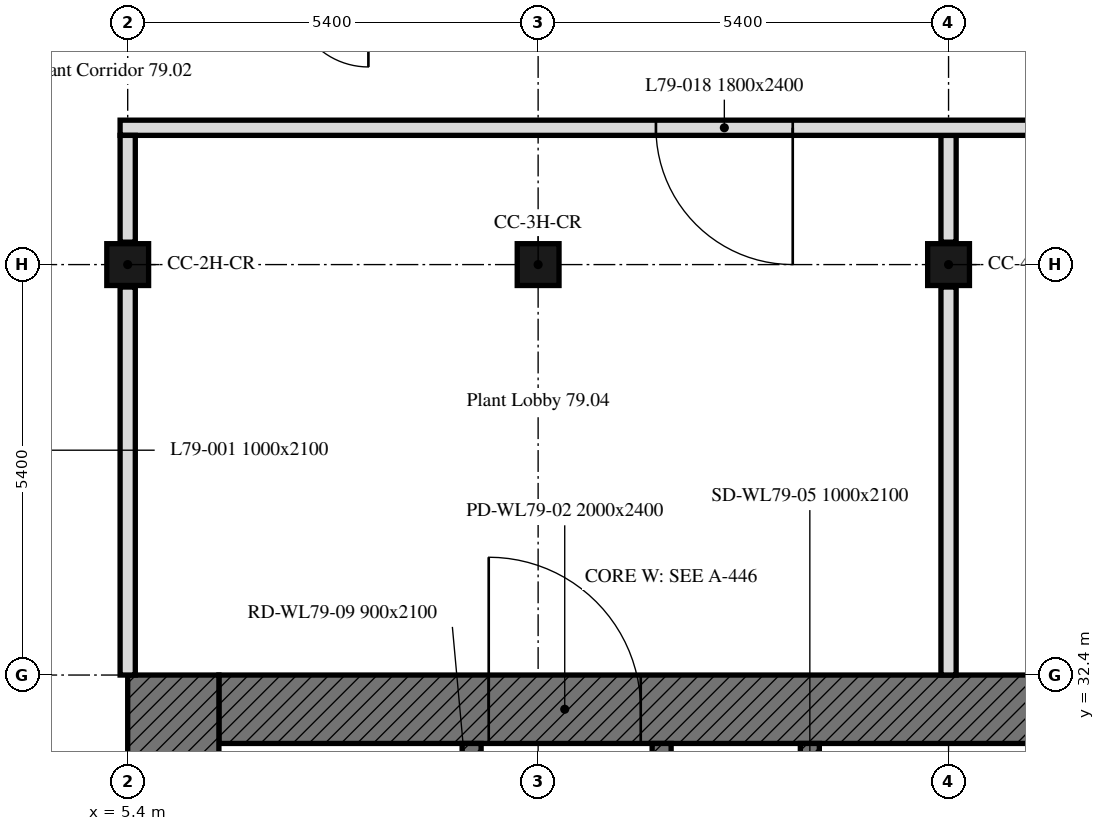
"""IFC4 building model, lengths in metres.
Left out: names, types, materials, properties, quantities, classifications, styles, units other than length and angle.
Written with IfcOpenShell. Run it as: python <this file> out.ifc"""

import sys

from ifc_helpers import new_model, si_unit, direction, frame, frame_2d, origin, origin_2d, place, context, subcontext, project, spatial, rectangle, extrude, element, fill, save


model = new_model("IFC4")
c1 = context("Model", 3, precision=1e-05, world=origin(), true_north=direction((0.0, 1.0)))
c2 = subcontext(c1, "Body", "Model", "MODEL_VIEW")
j1 = project(units=[si_unit("LENGTHUNIT", "METRE"), si_unit("PLANEANGLEUNIT", "RADIAN")], contexts=[c1])
p1 = place(None, origin())
s1 = spatial("IfcSite", under=j1, at=p1, CompositionType="ELEMENT")
p2 = place(p1, origin())
s2 = spatial("IfcBuilding", under=s1, at=p2, CompositionType="ELEMENT")
p3 = place(p2, frame((0.0, 0.0, 317.2)))
s3 = spatial("IfcBuildingStorey", under=s2, at=p3, CompositionType="ELEMENT", Elevation=317.2)
for number, where, z_axis, x_axis in (
    (1, (5.4, 37.8, 0.0), (0.0, 0.0, 1.0), (1.0, 0.0, 0.0)),
    (2, (10.8, 37.8, 0.0), (0.0, 0.0, 1.0), (1.0, 0.0, 0.0)),
    (3, (16.2, 37.8, 0.0), (0.0, 0.0, 1.0), (1.0, 0.0, 0.0)),
):
    element("IfcColumn", number, at=place(p3, frame(where, z_axis=z_axis, x_axis=x_axis)), inside=s3, PredefinedType="COLUMN", context=c2, shape_type="SweptSolid", body=[
        extrude(rectangle(XDim=0.55, YDim=0.55, at=origin_2d()), origin(), (0.0, 0.0, 1.0), 4.2),
    ])
p4 = place(p3, frame((6.6, 31.95, 0.0), z_axis=(0.0, 0.0, 1.0), x_axis=(1.0, 0.0, 0.0)))
e4 = element("IfcWall", 4, at=p4, inside=s3, PredefinedType="SOLIDWALL", context=c2, shape_type="SweptSolid", body=[
    extrude(rectangle(XDim=11.1, YDim=0.9, at=frame_2d((5.55, 0.0))), origin(), (0.0, 0.0, 1.0), 4.2),
])
p5 = place(p4, frame((3.55, 0.0, 0.0)))
e5 = element("IfcOpeningElement", 5, at=p5, cuts=e4, PredefinedType="OPENING", context=c2, shape_type="SweptSolid", body=[
    extrude(rectangle(XDim=2.0, YDim=2.4, at=frame_2d((1.0, 1.2))), frame((0.0, 0.45, 0.0), z_axis=(0.0, -1.0, 0.0), x_axis=(1.0, 0.0, 0.0)), (0.0, 0.0, 1.0), 0.9),
])
p6 = place(p3, frame((6.0, 16.2, 0.0), z_axis=(0.0, 0.0, 1.0), x_axis=(0.0, 1.0, 0.0)))
e6 = element("IfcWall", 6, at=p6, inside=s3, PredefinedType="SOLIDWALL", context=c2, shape_type="SweptSolid", body=[
    extrude(rectangle(XDim=16.2, YDim=1.2, at=frame_2d((8.1, 0.0))), origin(), (0.0, 0.0, 1.0), 4.2),
])
p7 = place(p3, frame((9.925, 17.1, 0.0), z_axis=(0.0, 0.0, 1.0), x_axis=(0.0, 1.0, 0.0)))
e7 = element("IfcWall", 7, at=p7, inside=s3, PredefinedType="SOLIDWALL", context=c2, shape_type="SweptSolid", body=[
    extrude(rectangle(XDim=14.4, YDim=0.25, at=frame_2d((7.2, 0.0))), origin(), (0.0, 0.0, 1.0), 4.2),
])
p8 = place(p7, frame((4.6, 0.0, 0.0)))
e8 = element("IfcOpeningElement", 8, at=p8, cuts=e7, PredefinedType="OPENING", context=c2, shape_type="SweptSolid", body=[
    extrude(rectangle(XDim=1.0, YDim=2.1, at=frame_2d((0.5, 1.05))), frame((0.0, 0.125, 0.0), z_axis=(0.0, -1.0, 0.0), x_axis=(1.0, 0.0, 0.0)), (0.0, 0.0, 1.0), 0.25),
])
p9 = place(p7, frame((7.062, 0.0, 0.0)))
e9 = element("IfcOpeningElement", 9, at=p9, cuts=e7, PredefinedType="OPENING", context=c2, shape_type="SweptSolid", body=[
    extrude(rectangle(XDim=1.2, YDim=2.1, at=frame_2d((0.6, 1.05))), frame((0.0, 0.125, 0.0), z_axis=(0.0, -1.0, 0.0), x_axis=(1.0, 0.0, 0.0)), (0.0, 0.0, 1.0), 0.25),
])
p10 = place(p7, frame((10.106, 0.0, 0.0)))
e10 = element("IfcOpeningElement", 10, at=p10, cuts=e7, PredefinedType="OPENING", context=c2, shape_type="SweptSolid", body=[
    extrude(rectangle(XDim=0.9, YDim=2.1, at=frame_2d((0.45, 1.05))), frame((0.0, 0.125, 0.0), z_axis=(0.0, -1.0, 0.0), x_axis=(1.0, 0.0, 0.0)), (0.0, 0.0, 1.0), 0.25),
])
p11 = place(p7, frame((12.719, 0.0, 0.0)))
e11 = element("IfcOpeningElement", 11, at=p11, cuts=e7, PredefinedType="OPENING", context=c2, shape_type="SweptSolid", body=[
    extrude(rectangle(XDim=0.9, YDim=2.1, at=frame_2d((0.45, 1.05))), frame((0.0, 0.125, 0.0), z_axis=(0.0, -1.0, 0.0), x_axis=(1.0, 0.0, 0.0)), (0.0, 0.0, 1.0), 0.25),
])
p12 = place(p3, frame((14.375, 17.1, 0.0), z_axis=(0.0, 0.0, 1.0), x_axis=(0.0, 1.0, 0.0)))
e12 = element("IfcWall", 12, at=p12, inside=s3, PredefinedType="SOLIDWALL", context=c2, shape_type="SweptSolid", body=[
    extrude(rectangle(XDim=14.4, YDim=0.25, at=frame_2d((7.2, 0.0))), origin(), (0.0, 0.0, 1.0), 4.2),
])
p13 = place(p12, frame((13.15, 0.0, 0.0)))
e13 = element("IfcOpeningElement", 13, at=p13, cuts=e12, PredefinedType="OPENING", context=c2, shape_type="SweptSolid", body=[
    extrude(rectangle(XDim=1.0, YDim=2.1, at=frame_2d((0.5, 1.05))), frame((0.0, 0.125, 0.0), z_axis=(0.0, -1.0, 0.0), x_axis=(1.0, 0.0, 0.0)), (0.0, 0.0, 1.0), 0.25),
])
p14 = place(p12, frame((0.968, 0.0, 0.0)))
e14 = element("IfcOpeningElement", 14, at=p14, cuts=e12, PredefinedType="OPENING", context=c2, shape_type="SweptSolid", body=[
    extrude(rectangle(XDim=0.9, YDim=2.1, at=frame_2d((0.45, 1.05))), frame((0.0, 0.125, 0.0), z_axis=(0.0, -1.0, 0.0), x_axis=(1.0, 0.0, 0.0)), (0.0, 0.0, 1.0), 0.25),
])
p15 = place(p12, frame((3.468, 0.0, 0.0)))
e15 = element("IfcOpeningElement", 15, at=p15, cuts=e12, PredefinedType="OPENING", context=c2, shape_type="SweptSolid", body=[
    extrude(rectangle(XDim=0.9, YDim=2.1, at=frame_2d((0.45, 1.05))), frame((0.0, 0.125, 0.0), z_axis=(0.0, -1.0, 0.0), x_axis=(1.0, 0.0, 0.0)), (0.0, 0.0, 1.0), 0.25),
])
p16 = place(p12, frame((6.175, 0.0, 0.0)))
e16 = element("IfcOpeningElement", 16, at=p16, cuts=e12, PredefinedType="OPENING", context=c2, shape_type="SweptSolid", body=[
    extrude(rectangle(XDim=0.9, YDim=2.1, at=frame_2d((0.45, 1.05))), frame((0.0, 0.125, 0.0), z_axis=(0.0, -1.0, 0.0), x_axis=(1.0, 0.0, 0.0)), (0.0, 0.0, 1.0), 0.25),
])
p17 = place(p3, frame((12.425, 29.4, 0.0), z_axis=(0.0, 0.0, 1.0), x_axis=(0.0, 1.0, 0.0)))
e17 = element("IfcWall", 17, at=p17, inside=s3, PredefinedType="SOLIDWALL", context=c2, shape_type="SweptSolid", body=[
    extrude(rectangle(XDim=2.1, YDim=0.25, at=frame_2d((1.05, 0.0))), origin(), (0.0, 0.0, 1.0), 4.2),
])
p18 = place(p17, frame((0.5, 0.0, 0.0)))
e18 = element("IfcOpeningElement", 18, at=p18, cuts=e17, PredefinedType="OPENING", context=c2, shape_type="SweptSolid", body=[
    extrude(rectangle(XDim=1.0, YDim=2.1, at=frame_2d((0.5, 1.05))), frame((0.0, 0.125, 0.0), z_axis=(0.0, -1.0, 0.0), x_axis=(1.0, 0.0, 0.0)), (0.0, 0.0, 1.0), 0.25),
])
p19 = place(p3, frame((16.2, 39.5, 0.0), z_axis=(0.0, 0.0, 1.0), x_axis=(0.0, -1.0, 0.0)))
e19 = element("IfcWall", 19, at=p19, inside=s3, PredefinedType="PARTITIONING", context=c2, shape_type="SweptSolid", body=[
    extrude(rectangle(XDim=1.405, YDim=0.2, at=frame_2d((0.703, 0.0))), origin(), (0.0, 0.0, 1.0), 3.45),
])
p20 = place(p3, frame((16.2, 37.505, 0.0), z_axis=(0.0, 0.0, 1.0), x_axis=(0.0, -1.0, 0.0)))
e20 = element("IfcWall", 20, at=p20, inside=s3, PredefinedType="PARTITIONING", context=c2, shape_type="SweptSolid", body=[
    extrude(rectangle(XDim=5.105, YDim=0.2, at=frame_2d((2.552, 0.0))), origin(), (0.0, 0.0, 1.0), 3.45),
])
p21 = place(p3, frame((42.449, 39.6, 0.0), z_axis=(0.0, 0.0, 1.0), x_axis=(-1.0, 0.0, 0.0)))
e21 = element("IfcWall", 21, at=p21, inside=s3, PredefinedType="PARTITIONING", context=c2, shape_type="SweptSolid", body=[
    extrude(rectangle(XDim=37.149, YDim=0.2, at=frame_2d((18.574, 0.0))), origin(), (0.0, 0.0, 1.0), 3.45),
])
p22 = place(p21, frame((12.249, 0.0, 0.0)))
e22 = element("IfcOpeningElement", 22, at=p22, cuts=e21, PredefinedType="OPENING", context=c2, shape_type="SweptSolid", body=[
    extrude(rectangle(XDim=1.0, YDim=2.1, at=frame_2d((0.5, 1.05))), frame((0.0, 0.1, 0.0), z_axis=(0.0, -1.0, 0.0), x_axis=(1.0, 0.0, 0.0)), (0.0, 0.0, 1.0), 0.2),
])
p23 = place(p21, frame((17.666, 0.0, 0.0)))
e23 = element("IfcOpeningElement", 23, at=p23, cuts=e21, PredefinedType="OPENING", context=c2, shape_type="SweptSolid", body=[
    extrude(rectangle(XDim=1.0, YDim=2.1, at=frame_2d((0.5, 1.05))), frame((0.0, 0.1, 0.0), z_axis=(0.0, -1.0, 0.0), x_axis=(1.0, 0.0, 0.0)), (0.0, 0.0, 1.0), 0.2),
])
p24 = place(p21, frame((1.299, 0.0, 0.0)))
e24 = element("IfcOpeningElement", 24, at=p24, cuts=e21, PredefinedType="OPENING", context=c2, shape_type="SweptSolid", body=[
    extrude(rectangle(XDim=1.8, YDim=2.4, at=frame_2d((0.9, 1.2))), frame((0.0, 0.1, 0.0), z_axis=(0.0, -1.0, 0.0), x_axis=(1.0, 0.0, 0.0)), (0.0, 0.0, 1.0), 0.2),
])
p25 = place(p21, frame((28.299, 0.0, 0.0)))
e25 = element("IfcOpeningElement", 25, at=p25, cuts=e21, PredefinedType="OPENING", context=c2, shape_type="SweptSolid", body=[
    extrude(rectangle(XDim=1.8, YDim=2.4, at=frame_2d((0.9, 1.2))), frame((0.0, 0.1, 0.0), z_axis=(0.0, -1.0, 0.0), x_axis=(1.0, 0.0, 0.0)), (0.0, 0.0, 1.0), 0.2),
])
p26 = place(p3, frame((5.4, 39.5, 0.0), z_axis=(0.0, 0.0, 1.0), x_axis=(0.0, -1.0, 0.0)))
e26 = element("IfcWall", 26, at=p26, inside=s3, PredefinedType="PARTITIONING", context=c2, shape_type="SweptSolid", body=[
    extrude(rectangle(XDim=1.405, YDim=0.2, at=frame_2d((0.703, 0.0))), origin(), (0.0, 0.0, 1.0), 4.2),
])
p27 = place(p3, frame((5.4, 37.505, 0.0), z_axis=(0.0, 0.0, 1.0), x_axis=(0.0, -1.0, 0.0)))
e27 = element("IfcWall", 27, at=p27, inside=s3, PredefinedType="PARTITIONING", context=c2, shape_type="SweptSolid", body=[
    extrude(rectangle(XDim=5.105, YDim=0.2, at=frame_2d((2.552, 0.0))), origin(), (0.0, 0.0, 1.0), 4.2),
])
p28 = place(p5, origin())
e28 = element("IfcDoor", 28, at=p28, inside=s3, OperationType="DOUBLE_DOOR_SINGLE_SWING", PredefinedType="DOOR", context=c2, shape_type="SweptSolid", body=[
    extrude(rectangle(XDim=2.0, YDim=2.4, at=frame_2d((1.0, 1.2))), frame((0.0, 0.025, 0.0), z_axis=(0.0, -1.0, 0.0), x_axis=(1.0, 0.0, 0.0)), (0.0, 0.0, 1.0), 0.05),
])
fill(e5, e28)
p29 = place(p25, origin())
e29 = element("IfcDoor", 29, at=p29, inside=s3, OperationType="DOUBLE_DOOR_SINGLE_SWING", PredefinedType="DOOR", context=c2, shape_type="SweptSolid", body=[
    extrude(rectangle(XDim=1.8, YDim=2.4, at=frame_2d((0.9, 1.2))), frame((0.0, 0.025, 0.0), z_axis=(0.0, -1.0, 0.0), x_axis=(1.0, 0.0, 0.0)), (0.0, 0.0, 1.0), 0.05),
])
fill(e25, e29)
save(model, sys.argv[1])
